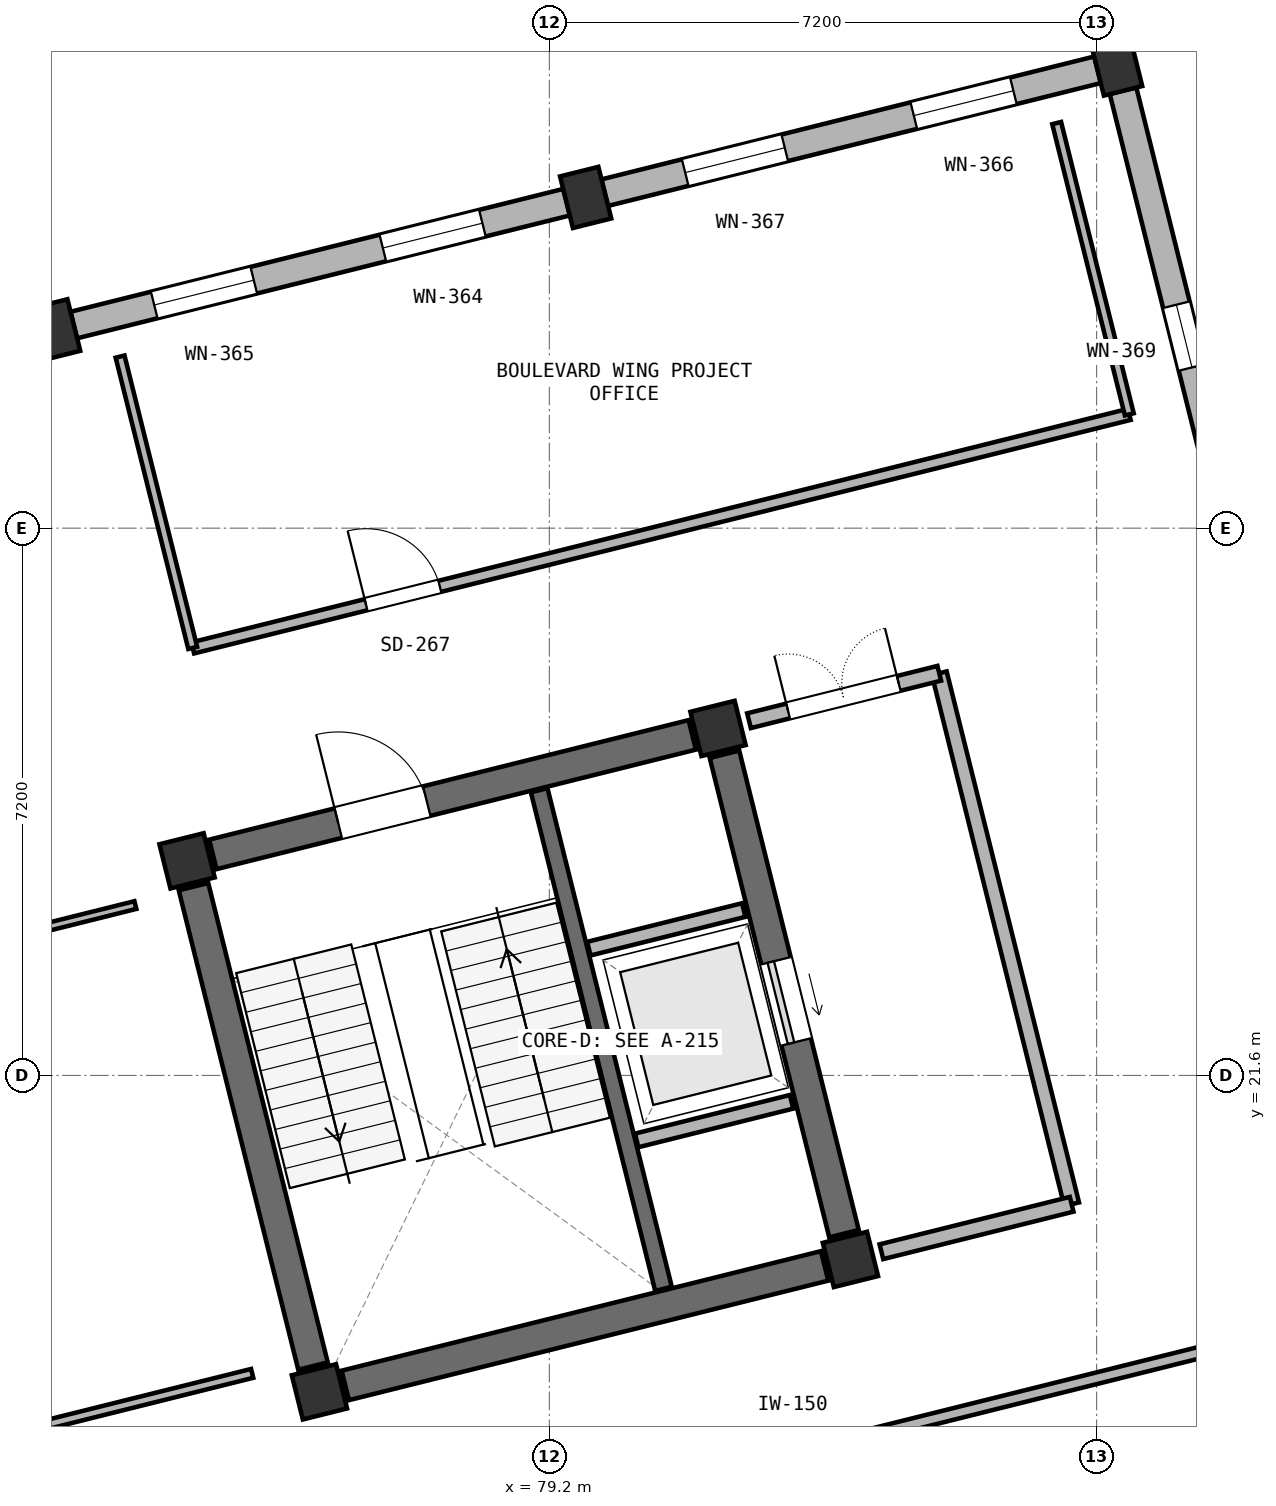
"""IFC4 building model, lengths in metres.
Left out: names, types, materials, properties, quantities, classifications, styles, units other than length and angle.
Written with IfcOpenShell. Run it as: python <this file> out.ifc"""

import sys

from ifc_helpers import new_model, si_unit, direction, frame, frame_2d, origin, origin_2d, place, context, subcontext, project, spatial, rectangle, extrude, element, fill, save


model = new_model("IFC4")
c1 = context("Model", 3, precision=1e-05, world=origin(), true_north=direction((0.0, 1.0)))
c2 = subcontext(c1, "Body", "Model", "MODEL_VIEW")
j1 = project(units=[si_unit("LENGTHUNIT", "METRE"), si_unit("PLANEANGLEUNIT", "RADIAN")], contexts=[c1])
p1 = place(None, origin())
s1 = spatial("IfcSite", under=j1, at=p1, CompositionType="ELEMENT")
p2 = place(p1, origin())
s2 = spatial("IfcBuilding", under=s1, at=p2, CompositionType="ELEMENT")
p3 = place(p2, frame((0.0, 0.0, 18.6)))
s3 = spatial("IfcBuildingStorey", under=s2, at=p3, CompositionType="ELEMENT", Elevation=18.6)
for number, where, z_axis, x_axis in (
    (1, (76.175, 17.437, 0.0), (0.0, 0.0, 1.0), (0.97, 0.242, 0.0)),
    (2, (74.433, 24.423, 0.0), (0.0, 0.0, 1.0), (0.97, 0.242, 0.0)),
):
    element("IfcColumn", number, at=place(p3, frame(where, z_axis=z_axis, x_axis=x_axis)), inside=s3, PredefinedType="COLUMN", context=c2, shape_type="SweptSolid", body=[
        extrude(rectangle(XDim=0.6, YDim=0.6, at=origin_2d()), origin(), (0.0, 0.0, 1.0), 3.9),
    ])
p4 = place(p3, frame((72.691, 31.409, 0.0), z_axis=(0.0, 0.0, 1.0), x_axis=(0.970295726276, 0.2419218956, 0.0)))
e3 = element("IfcColumn", 3, at=p4, inside=s3, PredefinedType="COLUMN", context=c2, shape_type="SweptSolid", body=[
    extrude(rectangle(XDim=0.52, YDim=0.7, at=origin_2d()), origin(), (0.0, 0.0, 1.0), 3.9),
])
for number, where, z_axis, x_axis in (
    (4, (83.161, 19.179, 0.0), (0.0, 0.0, 1.0), (0.97, 0.242, 0.0)),
    (5, (81.419, 26.165, 0.0), (0.0, 0.0, 1.0), (0.97, 0.242, 0.0)),
):
    element("IfcColumn", number, at=place(p3, frame(where, z_axis=z_axis, x_axis=x_axis)), inside=s3, PredefinedType="COLUMN", context=c2, shape_type="SweptSolid", body=[
        extrude(rectangle(XDim=0.6, YDim=0.6, at=origin_2d()), origin(), (0.0, 0.0, 1.0), 3.9),
    ])
for number, where, z_axis, x_axis in (
    (6, (79.677, 33.151, 0.0), (0.0, 0.0, 1.0), (0.97, 0.242, 0.0)),
    (7, (86.664, 34.893, 0.0), (0.0, 0.0, 1.0), (0.97, 0.242, 0.0)),
):
    element("IfcColumn", number, at=place(p3, frame(where, z_axis=z_axis, x_axis=x_axis)), inside=s3, PredefinedType="COLUMN", context=c2, shape_type="SweptSolid", body=[
        extrude(rectangle(XDim=0.52, YDim=0.7, at=origin_2d()), origin(), (0.0, 0.0, 1.0), 3.9),
    ])
p5 = place(p3, frame((76.515, 17.522, 0.0), z_axis=(0.0, 0.0, 1.0), x_axis=(0.970294759049, 0.241925774902, 0.0)))
e8 = element("IfcWall", 8, at=p5, inside=s3, PredefinedType="SHEAR", context=c2, shape_type="SweptSolid", body=[
    extrude(rectangle(XDim=6.5, YDim=0.4, at=frame_2d((3.25, 0.0))), origin(), (0.0, 0.0, 1.0), 3.9),
])
p6 = place(p3, frame((83.076, 19.519, 0.0), z_axis=(0.0, 0.0, 1.0), x_axis=(-0.241925774902, 0.970294759049, 0.0)))
e9 = element("IfcWall", 9, at=p6, inside=s3, PredefinedType="SHEAR", context=c2, shape_type="SweptSolid", body=[
    extrude(rectangle(XDim=6.5, YDim=0.4, at=frame_2d((3.25, 0.0))), origin(), (0.0, 0.0, 1.0), 3.9),
])
p7 = place(p6, frame((2.6, 0.0, 0.0)))
e10 = element("IfcOpeningElement", 10, at=p7, cuts=e9, PredefinedType="OPENING", context=c2, shape_type="SweptSolid", body=[
    extrude(rectangle(XDim=1.1, YDim=2.2, at=frame_2d((0.55, 1.1))), frame((0.0, 0.21, 0.0), z_axis=(0.0, -1.0, 0.0), x_axis=(1.0, 0.0, 0.0)), (0.0, 0.0, 1.0), 0.42),
])
p8 = place(p3, frame((81.08, 26.081, 0.0), z_axis=(0.0, 0.0, 1.0), x_axis=(-0.970294759049, -0.241925774902, 0.0)))
e11 = element("IfcWall", 11, at=p8, inside=s3, PredefinedType="SHEAR", context=c2, shape_type="SweptSolid", body=[
    extrude(rectangle(XDim=6.5, YDim=0.4, at=frame_2d((3.25, 0.0))), origin(), (0.0, 0.0, 1.0), 3.9),
])
p9 = place(p8, frame((3.6, 0.0, 0.0)))
e12 = element("IfcOpeningElement", 12, at=p9, cuts=e11, PredefinedType="OPENING", context=c2, shape_type="SweptSolid", body=[
    extrude(rectangle(XDim=1.2, YDim=2.2, at=frame_2d((0.6, 1.1))), frame((0.0, 0.21, 0.0), z_axis=(0.0, -1.0, 0.0), x_axis=(1.0, 0.0, 0.0)), (0.0, 0.0, 1.0), 0.42),
])
p10 = place(p3, frame((74.518, 24.084, 0.0), z_axis=(0.0, 0.0, 1.0), x_axis=(0.241925774902, -0.970294759049, 0.0)))
e13 = element("IfcWall", 13, at=p10, inside=s3, PredefinedType="SHEAR", context=c2, shape_type="SweptSolid", body=[
    extrude(rectangle(XDim=6.5, YDim=0.4, at=frame_2d((3.25, 0.0))), origin(), (0.0, 0.0, 1.0), 3.9),
])
p11 = place(p3, frame((80.701, 18.792, 0.0), z_axis=(0.0, 0.0, 1.0), x_axis=(-0.241898249226, 0.970301621673, 0.0)))
e14 = element("IfcWall", 14, at=p11, inside=s3, PredefinedType="SHEAR", context=c2, shape_type="SweptSolid", body=[
    extrude(rectangle(XDim=6.76, YDim=0.225, at=frame_2d((3.38, 0.0))), origin(), (0.0, 0.0, 1.0), 3.9),
])
for number, where, z_axis, x_axis in (
    (15, (80.349, 20.745, 0.0), (0.0, 0.0, 1.0), (0.97, 0.242, 0.0)),
    (16, (79.72, 23.268, 0.0), (0.0, 0.0, 1.0), (0.97, 0.242, 0.0)),
):
    element("IfcWall", number, at=place(p3, frame(where, z_axis=z_axis, x_axis=x_axis)), inside=s3, PredefinedType="PARTITIONING", context=c2, shape_type="SweptSolid", body=[
        extrude(rectangle(XDim=2.1, YDim=0.185, at=frame_2d((1.05, 0.0))), origin(), (0.0, 0.0, 1.0), 3.9),
    ])
p12 = place(p3, frame((79.427, 33.089, 0.0), z_axis=(0.0, 0.0, 1.0), x_axis=(-0.970297004388, -0.241916769314, 0.0)))
e17 = element("IfcWall", 17, at=p12, inside=s3, PredefinedType="SOLIDWALL", context=c2, shape_type="SweptSolid", body=[
    extrude(rectangle(XDim=6.684, YDim=0.36, at=frame_2d((3.342, 0.0))), origin(), (0.0, 0.0, 1.0), 2.74),
])
p13 = place(p12, frame((1.142, 0.0, 0.65)))
e18 = element("IfcOpeningElement", 18, at=p13, cuts=e17, PredefinedType="OPENING", context=c2, shape_type="SweptSolid", body=[
    extrude(rectangle(XDim=1.35, YDim=1.94, at=frame_2d((0.675, 0.97))), frame((0.0, 0.19, 0.0), z_axis=(0.0, -1.0, 0.0), x_axis=(1.0, 0.0, 0.0)), (0.0, 0.0, 1.0), 0.38),
])
p14 = place(p12, frame((4.242, 0.0, 0.65)))
e19 = element("IfcOpeningElement", 19, at=p14, cuts=e17, PredefinedType="OPENING", context=c2, shape_type="SweptSolid", body=[
    extrude(rectangle(XDim=1.35, YDim=1.94, at=frame_2d((0.675, 0.97))), frame((0.0, 0.19, 0.0), z_axis=(0.0, -1.0, 0.0), x_axis=(1.0, 0.0, 0.0)), (0.0, 0.0, 1.0), 0.38),
])
p15 = place(p3, frame((86.413, 34.831, 0.0), z_axis=(0.0, 0.0, 1.0), x_axis=(-0.970297004388, -0.241916769314, 0.0)))
e20 = element("IfcWall", 20, at=p15, inside=s3, PredefinedType="SOLIDWALL", context=c2, shape_type="SweptSolid", body=[
    extrude(rectangle(XDim=6.684, YDim=0.36, at=frame_2d((3.342, 0.0))), origin(), (0.0, 0.0, 1.0), 2.74),
])
p16 = place(p15, frame((1.142, 0.0, 0.65)))
e21 = element("IfcOpeningElement", 21, at=p16, cuts=e20, PredefinedType="OPENING", context=c2, shape_type="SweptSolid", body=[
    extrude(rectangle(XDim=1.35, YDim=1.94, at=frame_2d((0.675, 0.97))), frame((0.0, 0.19, 0.0), z_axis=(0.0, -1.0, 0.0), x_axis=(1.0, 0.0, 0.0)), (0.0, 0.0, 1.0), 0.38),
])
p17 = place(p15, frame((4.242, 0.0, 0.65)))
e22 = element("IfcOpeningElement", 22, at=p17, cuts=e20, PredefinedType="OPENING", context=c2, shape_type="SweptSolid", body=[
    extrude(rectangle(XDim=1.35, YDim=1.94, at=frame_2d((0.675, 0.97))), frame((0.0, 0.19, 0.0), z_axis=(0.0, -1.0, 0.0), x_axis=(1.0, 0.0, 0.0)), (0.0, 0.0, 1.0), 0.38),
])
p18 = place(p3, frame((88.321, 28.245, 0.0), z_axis=(0.0, 0.0, 1.0), x_axis=(-0.241926152475, 0.970294664908, 0.0)))
e23 = element("IfcWall", 23, at=p18, inside=s3, PredefinedType="SOLIDWALL", context=c2, shape_type="SweptSolid", body=[
    extrude(rectangle(XDim=6.504, YDim=0.36, at=frame_2d((3.252, 0.0))), origin(), (0.0, 0.0, 1.0), 2.74),
])
p19 = place(p18, frame((2.752, 0.0, 0.7)))
e24 = element("IfcOpeningElement", 24, at=p19, cuts=e23, PredefinedType="OPENING", context=c2, shape_type="SweptSolid", body=[
    extrude(rectangle(XDim=0.85, YDim=1.89, at=frame_2d((0.425, 0.945))), frame((0.0, 0.19, 0.0), z_axis=(0.0, -1.0, 0.0), x_axis=(1.0, 0.0, 0.0)), (0.0, 0.0, 1.0), 0.38),
])
p20 = place(p3, frame((86.072, 19.905, 0.0), z_axis=(0.0, 0.0, 1.0), x_axis=(-0.241937193493, 0.970291911955, 0.0)))
e25 = element("IfcWall", 25, at=p20, inside=s3, PredefinedType="PARTITIONING", context=c2, shape_type="SweptSolid", body=[
    extrude(rectangle(XDim=7.2, YDim=0.2, at=frame_2d((3.6, 0.0))), origin(), (0.0, 0.0, 1.0), 2.78),
])
p21 = place(p3, frame((83.569, 19.281, 0.0), z_axis=(0.0, 0.0, 1.0), x_axis=(0.970287048366, 0.241956698135, 0.0)))
e26 = element("IfcWall", 26, at=p21, inside=s3, PredefinedType="PARTITIONING", context=c2, shape_type="SweptSolid", body=[
    extrude(rectangle(XDim=2.58, YDim=0.2, at=frame_2d((1.29, 0.0))), origin(), (0.0, 0.0, 1.0), 2.78),
])
p22 = place(p3, frame((84.33, 26.891, 0.0), z_axis=(0.0, 0.0, 1.0), x_axis=(-0.970309259708, -0.2418676095, 0.0)))
e27 = element("IfcWall", 27, at=p22, inside=s3, PredefinedType="PARTITIONING", context=c2, shape_type="SweptSolid", body=[
    extrude(rectangle(XDim=2.58, YDim=0.2, at=frame_2d((1.29, 0.0))), origin(), (0.0, 0.0, 1.0), 2.78),
])
p23 = place(p22, frame((0.55, 0.0, 0.0)))
e28 = element("IfcOpeningElement", 28, at=p23, cuts=e27, PredefinedType="OPENING", context=c2, shape_type="SweptSolid", body=[
    extrude(rectangle(XDim=1.5, YDim=2.2, at=frame_2d((0.75, 1.1))), frame((0.0, 0.11, 0.0), z_axis=(0.0, -1.0, 0.0), x_axis=(1.0, 0.0, 0.0)), (0.0, 0.0, 1.0), 0.22),
])
p24 = place(p3, frame((75.13, 14.806, 0.0), z_axis=(0.0, 0.0, 1.0), x_axis=(0.970295306268, 0.241923580152, 0.0)))
e29 = element("IfcWall", 29, at=p24, inside=s3, PredefinedType="PARTITIONING", context=c2, shape_type="SweptSolid", body=[
    extrude(rectangle(XDim=15.3, YDim=0.15, at=frame_2d((7.65, 0.0))), origin(), (0.0, 0.0, 1.0), 2.78),
])
p25 = place(p24, frame((1.95, 0.0, 0.0)))
e30 = element("IfcOpeningElement", 30, at=p25, cuts=e29, PredefinedType="OPENING", context=c2, shape_type="SweptSolid", body=[
    extrude(rectangle(XDim=1.0, YDim=2.2, at=frame_2d((0.5, 1.1))), frame((0.0, 0.085, 0.0), z_axis=(0.0, -1.0, 0.0), x_axis=(1.0, 0.0, 0.0)), (0.0, 0.0, 1.0), 0.17),
])
p26 = place(p3, frame((73.754, 23.842, 0.0), z_axis=(0.0, 0.0, 1.0), x_axis=(-0.970295954135, -0.241920981706, 0.0)))
e31 = element("IfcWall", 31, at=p26, inside=s3, PredefinedType="PARTITIONING", context=c2, shape_type="SweptSolid", body=[
    extrude(rectangle(XDim=18.6, YDim=0.105, at=frame_2d((9.3, 0.0))), origin(), (0.0, 0.0, 1.0), 2.78),
])
p27 = place(p26, frame((9.2, 0.0, 0.0)))
e32 = element("IfcOpeningElement", 32, at=p27, cuts=e31, PredefinedType="OPENING", context=c2, shape_type="SweptSolid", body=[
    extrude(rectangle(XDim=1.6, YDim=2.2, at=frame_2d((0.8, 1.1))), frame((0.0, 0.062, 0.0), z_axis=(0.0, -1.0, 0.0), x_axis=(1.0, 0.0, 0.0)), (0.0, 0.0, 1.0), 0.125),
])
p28 = place(p3, frame((57.242, 13.18, 0.0), z_axis=(0.0, 0.0, 1.0), x_axis=(0.970295185925, 0.24192406282, 0.0)))
e33 = element("IfcWall", 33, at=p28, inside=s3, PredefinedType="PARTITIONING", context=c2, shape_type="SweptSolid", body=[
    extrude(rectangle(XDim=18.6, YDim=0.12, at=frame_2d((9.3, 0.0))), origin(), (0.0, 0.0, 1.0), 2.78),
])
p29 = place(p3, frame((74.508, 27.225, 0.0), z_axis=(0.0, 0.0, 1.0), x_axis=(0.970298350757, 0.241911369139, 0.0)))
e34 = element("IfcWall", 34, at=p29, inside=s3, PredefinedType="PARTITIONING", context=c2, shape_type="SweptSolid", body=[
    extrude(rectangle(XDim=12.7, YDim=0.15, at=frame_2d((6.35, 0.0))), origin(), (0.0, 0.0, 1.0), 2.78),
])
p30 = place(p29, frame((2.35, 0.0, 0.0)))
e35 = element("IfcOpeningElement", 35, at=p30, cuts=e34, PredefinedType="OPENING", context=c2, shape_type="SweptSolid", body=[
    extrude(rectangle(XDim=1.0, YDim=2.15, at=frame_2d((0.5, 1.075))), frame((0.0, 0.085, 0.0), z_axis=(0.0, -1.0, 0.0), x_axis=(1.0, 0.0, 0.0)), (0.0, 0.0, 1.0), 0.17),
])
p31 = place(p3, frame((74.508, 27.225, 0.0), z_axis=(0.0, 0.0, 1.0), x_axis=(-0.241924747697, 0.970295015164, 0.0)))
e36 = element("IfcWall", 36, at=p31, inside=s3, PredefinedType="PARTITIONING", context=c2, shape_type="SweptSolid", body=[
    extrude(rectangle(XDim=3.95, YDim=0.12, at=frame_2d((1.975, 0.0))), origin(), (0.0, 0.0, 1.0), 2.78),
])
p32 = place(p3, frame((85.875, 34.13, 0.0), z_axis=(0.0, 0.0, 1.0), x_axis=(0.241910239337, -0.970298632434, 0.0)))
e37 = element("IfcWall", 37, at=p32, inside=s3, PredefinedType="PARTITIONING", context=c2, shape_type="SweptSolid", body=[
    extrude(rectangle(XDim=3.95, YDim=0.12, at=frame_2d((1.975, 0.0))), origin(), (0.0, 0.0, 1.0), 2.78),
])
p33 = place(p7, origin())
e38 = element("IfcDoor", 38, at=p33, inside=s3, OperationType="SLIDING_TO_LEFT", PredefinedType="DOOR", context=c2, shape_type="SweptSolid", body=[
    extrude(rectangle(XDim=1.1, YDim=2.2, at=frame_2d((0.55, 1.1))), frame((0.0, 0.025, 0.0), z_axis=(0.0, -1.0, 0.0), x_axis=(1.0, 0.0, 0.0)), (0.0, 0.0, 1.0), 0.05),
])
fill(e10, e38)
p34 = place(p13, origin())
e39 = element("IfcWindow", 39, at=p34, inside=s3, PartitioningType="DOUBLE_PANEL_VERTICAL", PredefinedType="WINDOW", context=c2, shape_type="SweptSolid", body=[
    extrude(rectangle(XDim=1.35, YDim=1.94, at=frame_2d((0.675, 0.97))), frame((0.0, 0.03, 0.0), z_axis=(0.0, -1.0, 0.0), x_axis=(1.0, 0.0, 0.0)), (0.0, 0.0, 1.0), 0.06),
])
fill(e18, e39)
p35 = place(p14, origin())
e40 = element("IfcWindow", 40, at=p35, inside=s3, PartitioningType="DOUBLE_PANEL_VERTICAL", PredefinedType="WINDOW", context=c2, shape_type="SweptSolid", body=[
    extrude(rectangle(XDim=1.35, YDim=1.94, at=frame_2d((0.675, 0.97))), frame((0.0, 0.03, 0.0), z_axis=(0.0, -1.0, 0.0), x_axis=(1.0, 0.0, 0.0)), (0.0, 0.0, 1.0), 0.06),
])
fill(e19, e40)
p36 = place(p16, origin())
e41 = element("IfcWindow", 41, at=p36, inside=s3, PartitioningType="DOUBLE_PANEL_VERTICAL", PredefinedType="WINDOW", context=c2, shape_type="SweptSolid", body=[
    extrude(rectangle(XDim=1.35, YDim=1.94, at=frame_2d((0.675, 0.97))), frame((0.0, 0.03, 0.0), z_axis=(0.0, -1.0, 0.0), x_axis=(1.0, 0.0, 0.0)), (0.0, 0.0, 1.0), 0.06),
])
fill(e21, e41)
p37 = place(p17, origin())
e42 = element("IfcWindow", 42, at=p37, inside=s3, PartitioningType="DOUBLE_PANEL_VERTICAL", PredefinedType="WINDOW", context=c2, shape_type="SweptSolid", body=[
    extrude(rectangle(XDim=1.35, YDim=1.94, at=frame_2d((0.675, 0.97))), frame((0.0, 0.03, 0.0), z_axis=(0.0, -1.0, 0.0), x_axis=(1.0, 0.0, 0.0)), (0.0, 0.0, 1.0), 0.06),
])
fill(e22, e42)
p38 = place(p19, origin())
e43 = element("IfcWindow", 43, at=p38, inside=s3, PartitioningType="SINGLE_PANEL", PredefinedType="WINDOW", context=c2, shape_type="SweptSolid", body=[
    extrude(rectangle(XDim=0.85, YDim=1.89, at=frame_2d((0.425, 0.945))), frame((0.0, 0.03, 0.0), z_axis=(0.0, -1.0, 0.0), x_axis=(1.0, 0.0, 0.0)), (0.0, 0.0, 1.0), 0.06),
])
fill(e24, e43)
p39 = place(p9, frame((1.2, 0.0, 0.0), z_axis=(0.0, 0.0, 1.0), x_axis=(-1.0, 0.0, 0.0)))
e44 = element("IfcDoor", 44, at=p39, inside=s3, OperationType="SINGLE_SWING_LEFT", PredefinedType="DOOR", context=c2, shape_type="SweptSolid", body=[
    extrude(rectangle(XDim=1.2, YDim=2.2, at=frame_2d((0.6, 1.1))), frame((0.0, 0.025, 0.0), z_axis=(0.0, -1.0, 0.0), x_axis=(1.0, 0.0, 0.0)), (0.0, 0.0, 1.0), 0.05),
])
fill(e12, e44)
p40 = place(p23, frame((1.5, 0.0, 0.0), z_axis=(0.0, 0.0, 1.0), x_axis=(-1.0, 0.0, 0.0)))
e45 = element("IfcDoor", 45, at=p40, inside=s3, OperationType="DOUBLE_DOOR_SINGLE_SWING", PredefinedType="DOOR", context=c2, shape_type="SweptSolid", body=[
    extrude(rectangle(XDim=1.5, YDim=2.2, at=frame_2d((0.75, 1.1))), frame((0.0, 0.025, 0.0), z_axis=(0.0, -1.0, 0.0), x_axis=(1.0, 0.0, 0.0)), (0.0, 0.0, 1.0), 0.05),
])
fill(e28, e45)
p41 = place(p30, origin())
e46 = element("IfcDoor", 46, at=p41, inside=s3, OperationType="SINGLE_SWING_LEFT", PredefinedType="DOOR", context=c2, shape_type="SweptSolid", body=[
    extrude(rectangle(XDim=1.0, YDim=2.15, at=frame_2d((0.5, 1.075))), frame((0.0, 0.025, 0.0), z_axis=(0.0, -1.0, 0.0), x_axis=(1.0, 0.0, 0.0)), (0.0, 0.0, 1.0), 0.05),
])
fill(e35, e46)
save(model, sys.argv[1])
